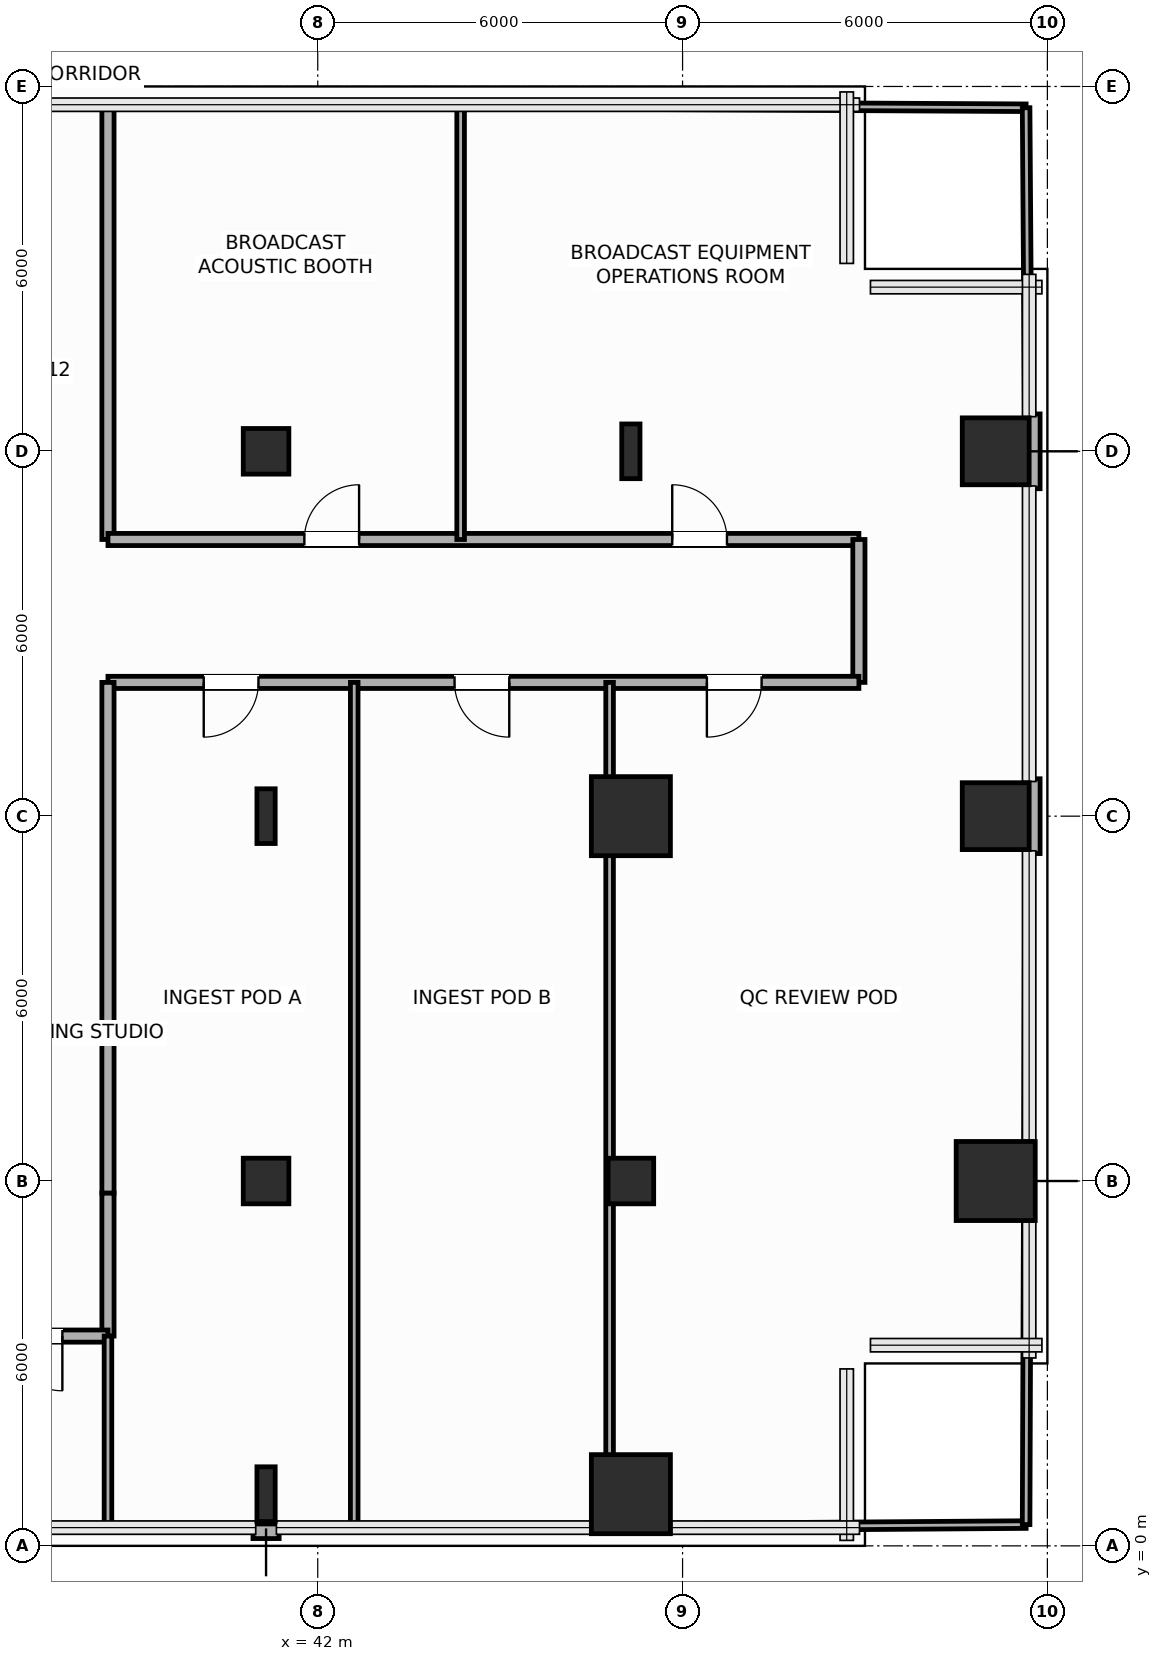
"""IFC4 building model, lengths in metres.
Left out: names, types, materials, properties, quantities, classifications, styles, units other than length and angle.
Written with IfcOpenShell. Run it as: python <this file> out.ifc"""

import sys

from ifc_helpers import new_model, si_unit, direction, frame, frame_2d, origin, origin_2d, place, context, subcontext, project, spatial, rectangle, hollow_rectangle, i_section, extrude, element, fill, save


model = new_model("IFC4")
c1 = context("Model", 3, precision=1e-05, world=origin(), true_north=direction((0.0, 1.0)))
c2 = subcontext(c1, "Body", "Model", "MODEL_VIEW")
j1 = project(units=[si_unit("LENGTHUNIT", "METRE"), si_unit("PLANEANGLEUNIT", "RADIAN")], contexts=[c1])
p1 = place(None, origin())
s1 = spatial("IfcSite", under=j1, at=p1, CompositionType="ELEMENT")
p2 = place(p1, origin())
s2 = spatial("IfcBuilding", under=s1, at=p2, CompositionType="ELEMENT")
p3 = place(p2, frame((0.0, 0.0, 48.0)))
s3 = spatial("IfcBuildingStorey", under=s2, at=p3, CompositionType="ELEMENT", Elevation=48.0)
p4 = place(p3, frame((41.15, 0.85, 0.0), z_axis=(0.0, 0.0, 1.0), x_axis=(1.0, 0.0, 0.0)))
e1 = element("IfcColumn", 1, at=p4, inside=s3, PredefinedType="COLUMN", context=c2, shape_type="SweptSolid", body=[
    extrude(i_section(OverallWidth=0.3, OverallDepth=0.9, WebThickness=0.019, FlangeThickness=0.035, FilletRadius=0.03, at=origin_2d()), origin(), (0.0, 0.0, 1.0), 3.9),
])
p5 = place(p3, frame((41.15, 6.0, 0.0), z_axis=(0.0, 0.0, 1.0), x_axis=(1.0, 0.0, 0.0)))
e2 = element("IfcColumn", 2, at=p5, inside=s3, PredefinedType="COLUMN", context=c2, shape_type="SweptSolid", body=[
    extrude(hollow_rectangle(XDim=0.75, YDim=0.75, WallThickness=0.035, InnerFilletRadius=0.035, OuterFilletRadius=0.05, at=origin_2d()), origin(), (0.0, 0.0, 1.0), 3.9),
])
p6 = place(p3, frame((41.15, 12.0, 0.0), z_axis=(0.0, 0.0, 1.0), x_axis=(1.0, 0.0, 0.0)))
e3 = element("IfcColumn", 3, at=p6, inside=s3, PredefinedType="COLUMN", context=c2, shape_type="SweptSolid", body=[
    extrude(i_section(OverallWidth=0.3, OverallDepth=0.9, WebThickness=0.019, FlangeThickness=0.035, FilletRadius=0.03, at=origin_2d()), origin(), (0.0, 0.0, 1.0), 3.9),
])
p7 = place(p3, frame((41.15, 18.0, 0.0), z_axis=(0.0, 0.0, 1.0), x_axis=(1.0, 0.0, 0.0)))
e4 = element("IfcColumn", 4, at=p7, inside=s3, PredefinedType="COLUMN", context=c2, shape_type="SweptSolid", body=[
    extrude(hollow_rectangle(XDim=0.75, YDim=0.75, WallThickness=0.035, InnerFilletRadius=0.035, OuterFilletRadius=0.05, at=origin_2d()), origin(), (0.0, 0.0, 1.0), 3.9),
])
p8 = place(p3, frame((47.15, 0.85, 0.0), z_axis=(0.0, 0.0, 1.0), x_axis=(1.0, 0.0, 0.0)))
e5 = element("IfcColumn", 5, at=p8, inside=s3, PredefinedType="COLUMN", context=c2, shape_type="SweptSolid", body=[
    extrude(rectangle(XDim=1.3, YDim=1.3, at=origin_2d()), origin(), (0.0, 0.0, 1.0), 3.9),
])
p9 = place(p3, frame((47.15, 6.0, 0.0), z_axis=(0.0, 0.0, 1.0), x_axis=(1.0, 0.0, 0.0)))
e6 = element("IfcColumn", 6, at=p9, inside=s3, PredefinedType="COLUMN", context=c2, shape_type="SweptSolid", body=[
    extrude(hollow_rectangle(XDim=0.75, YDim=0.75, WallThickness=0.035, InnerFilletRadius=0.035, OuterFilletRadius=0.05, at=origin_2d()), origin(), (0.0, 0.0, 1.0), 3.9),
])
p10 = place(p3, frame((47.15, 12.0, 0.0), z_axis=(0.0, 0.0, 1.0), x_axis=(1.0, 0.0, 0.0)))
e7 = element("IfcColumn", 7, at=p10, inside=s3, PredefinedType="COLUMN", context=c2, shape_type="SweptSolid", body=[
    extrude(rectangle(XDim=1.3, YDim=1.3, at=origin_2d()), origin(), (0.0, 0.0, 1.0), 3.9),
])
p11 = place(p3, frame((47.15, 18.0, 0.0), z_axis=(0.0, 0.0, 1.0), x_axis=(1.0, 0.0, 0.0)))
e8 = element("IfcColumn", 8, at=p11, inside=s3, PredefinedType="COLUMN", context=c2, shape_type="SweptSolid", body=[
    extrude(i_section(OverallWidth=0.3, OverallDepth=0.9, WebThickness=0.019, FlangeThickness=0.035, FilletRadius=0.03, at=origin_2d()), origin(), (0.0, 0.0, 1.0), 3.9),
])
p12 = place(p3, frame((53.15, 6.0, 0.0), z_axis=(0.0, 0.0, 1.0), x_axis=(1.0, 0.0, 0.0)))
e9 = element("IfcColumn", 9, at=p12, inside=s3, PredefinedType="COLUMN", context=c2, shape_type="SweptSolid", body=[
    extrude(rectangle(XDim=1.3, YDim=1.3, at=origin_2d()), origin(), (0.0, 0.0, 1.0), 3.9),
])
for number, where, z_axis, x_axis in (
    (10, (53.15, 12.0, 0.0), (0.0, 0.0, 1.0), (1.0, 0.0, 0.0)),
    (11, (53.15, 18.0, 0.0), (0.0, 0.0, 1.0), (1.0, 0.0, 0.0)),
):
    element("IfcColumn", number, at=place(p3, frame(where, z_axis=z_axis, x_axis=x_axis)), inside=s3, PredefinedType="COLUMN", context=c2, shape_type="SweptSolid", body=[
        extrude(rectangle(XDim=1.1, YDim=1.1, at=origin_2d()), origin(), (0.0, 0.0, 1.0), 3.9),
    ])
for number, where, z_axis, x_axis in (
    (12, (53.76, 18.615, 0.0), (0.0, 0.0, 1.0), (0.0, -1.0, 0.0)),
    (13, (53.76, 12.615, 0.0), (0.0, 0.0, 1.0), (0.0, -1.0, 0.0)),
):
    element("IfcWall", number, at=place(p3, frame(where, z_axis=z_axis, x_axis=x_axis)), inside=s3, PredefinedType="SOLIDWALL", context=c2, shape_type="SweptSolid", body=[
        extrude(rectangle(XDim=1.23, YDim=0.24, at=frame_2d((0.615, 0.0))), origin(), (0.0, 0.0, 1.0), 3.65),
    ])
p13 = place(p3, frame((41.365, 0.24, 0.0), z_axis=(0.0, 0.0, 1.0), x_axis=(-1.0, 0.0, 0.0)))
e14 = element("IfcWall", 14, at=p13, inside=s3, PredefinedType="SOLIDWALL", context=c2, shape_type="SweptSolid", body=[
    extrude(rectangle(XDim=0.43, YDim=0.24, at=frame_2d((0.215, 0.0))), origin(), (0.0, 0.0, 1.0), 3.65),
])
p14 = place(p3, frame((38.55, 23.7, 0.0), z_axis=(0.0, 0.0, 1.0), x_axis=(0.0, -1.0, 0.0)))
e15 = element("IfcWall", 15, at=p14, inside=s3, PredefinedType="PARTITIONING", context=c2, shape_type="SweptSolid", body=[
    extrude(rectangle(XDim=7.15, YDim=0.2, at=frame_2d((3.575, 0.0))), origin(), (0.0, 0.0, 1.0), 3.65),
])
p15 = place(p3, frame((38.55, 16.55, 0.0), z_axis=(0.0, 0.0, 1.0), x_axis=(1.0, 0.0, 0.0)))
e16 = element("IfcWall", 16, at=p15, inside=s3, PredefinedType="PARTITIONING", context=c2, shape_type="SweptSolid", body=[
    extrude(rectangle(XDim=12.35, YDim=0.2, at=frame_2d((6.175, 0.0))), origin(), (0.0, 0.0, 1.0), 3.65),
])
p16 = place(p15, frame((3.23, 0.0, 0.0)))
e17 = element("IfcOpeningElement", 17, at=p16, cuts=e16, PredefinedType="OPENING", context=c2, shape_type="SweptSolid", body=[
    extrude(rectangle(XDim=0.9, YDim=2.1, at=frame_2d((0.45, 1.05))), frame((0.0, 0.11, 0.0), z_axis=(0.0, -1.0, 0.0), x_axis=(1.0, 0.0, 0.0)), (0.0, 0.0, 1.0), 0.22),
])
p17 = place(p15, frame((9.28, 0.0, 0.0)))
e18 = element("IfcOpeningElement", 18, at=p17, cuts=e16, PredefinedType="OPENING", context=c2, shape_type="SweptSolid", body=[
    extrude(rectangle(XDim=0.9, YDim=2.1, at=frame_2d((0.45, 1.05))), frame((0.0, 0.11, 0.0), z_axis=(0.0, -1.0, 0.0), x_axis=(1.0, 0.0, 0.0)), (0.0, 0.0, 1.0), 0.22),
])
p18 = place(p3, frame((50.9, 16.55, 0.0), z_axis=(0.0, 0.0, 1.0), x_axis=(0.0, -1.0, 0.0)))
e19 = element("IfcWall", 19, at=p18, inside=s3, PredefinedType="PARTITIONING", context=c2, shape_type="SweptSolid", body=[
    extrude(rectangle(XDim=2.35, YDim=0.2, at=frame_2d((1.175, 0.0))), origin(), (0.0, 0.0, 1.0), 3.65),
])
p19 = place(p3, frame((50.9, 14.2, 0.0), z_axis=(0.0, 0.0, 1.0), x_axis=(-1.0, 0.0, 0.0)))
e20 = element("IfcWall", 20, at=p19, inside=s3, PredefinedType="PARTITIONING", context=c2, shape_type="SweptSolid", body=[
    extrude(rectangle(XDim=12.35, YDim=0.2, at=frame_2d((6.175, 0.0))), origin(), (0.0, 0.0, 1.0), 3.65),
])
p20 = place(p19, frame((9.875, 0.0, 0.0)))
e21 = element("IfcOpeningElement", 21, at=p20, cuts=e20, PredefinedType="OPENING", context=c2, shape_type="SweptSolid", body=[
    extrude(rectangle(XDim=0.9, YDim=2.1, at=frame_2d((0.45, 1.05))), frame((0.0, 0.11, 0.0), z_axis=(0.0, -1.0, 0.0), x_axis=(1.0, 0.0, 0.0)), (0.0, 0.0, 1.0), 0.22),
])
p21 = place(p19, frame((5.75, 0.0, 0.0)))
e22 = element("IfcOpeningElement", 22, at=p21, cuts=e20, PredefinedType="OPENING", context=c2, shape_type="SweptSolid", body=[
    extrude(rectangle(XDim=0.9, YDim=2.1, at=frame_2d((0.45, 1.05))), frame((0.0, 0.11, 0.0), z_axis=(0.0, -1.0, 0.0), x_axis=(1.0, 0.0, 0.0)), (0.0, 0.0, 1.0), 0.22),
])
p22 = place(p19, frame((1.6, 0.0, 0.0)))
e23 = element("IfcOpeningElement", 23, at=p22, cuts=e20, PredefinedType="OPENING", context=c2, shape_type="SweptSolid", body=[
    extrude(rectangle(XDim=0.9, YDim=2.1, at=frame_2d((0.45, 1.05))), frame((0.0, 0.11, 0.0), z_axis=(0.0, -1.0, 0.0), x_axis=(1.0, 0.0, 0.0)), (0.0, 0.0, 1.0), 0.22),
])
p23 = place(p3, frame((38.55, 14.2, 0.0), z_axis=(0.0, 0.0, 1.0), x_axis=(0.0, -1.0, 0.0)))
e24 = element("IfcWall", 24, at=p23, inside=s3, PredefinedType="PARTITIONING", context=c2, shape_type="SweptSolid", body=[
    extrude(rectangle(XDim=8.4, YDim=0.2, at=frame_2d((4.2, 0.0))), origin(), (0.0, 0.0, 1.0), 3.65),
])
p24 = place(p3, frame((38.55, 5.8, 0.0), z_axis=(0.0, 0.0, 1.0), x_axis=(0.0, -1.0, 0.0)))
e25 = element("IfcWall", 25, at=p24, inside=s3, PredefinedType="PARTITIONING", context=c2, shape_type="SweptSolid", body=[
    extrude(rectangle(XDim=2.35, YDim=0.2, at=frame_2d((1.175, 0.0))), origin(), (0.0, 0.0, 1.0), 3.65),
])
p25 = place(p3, frame((38.55, 3.45, 0.0), z_axis=(0.0, 0.0, 1.0), x_axis=(-1.0, 0.0, 0.0)))
e26 = element("IfcWall", 26, at=p25, inside=s3, PredefinedType="PARTITIONING", context=c2, shape_type="SweptSolid", body=[
    extrude(rectangle(XDim=2.4, YDim=0.2, at=frame_2d((1.2, 0.0))), origin(), (0.0, 0.0, 1.0), 3.142),
])
p26 = place(p25, frame((0.75, 0.0, 0.0)))
e27 = element("IfcOpeningElement", 27, at=p26, cuts=e26, PredefinedType="OPENING", context=c2, shape_type="SweptSolid", body=[
    extrude(rectangle(XDim=0.9, YDim=2.1, at=frame_2d((0.45, 1.05))), frame((0.0, 0.11, 0.0), z_axis=(0.0, -1.0, 0.0), x_axis=(1.0, 0.0, 0.0)), (0.0, 0.0, 1.0), 0.22),
])
for number, where, z_axis, x_axis in (
    (28, (42.6, 0.3, 0.0), (0.0, 0.0, 1.0), (0.0, 1.0, 0.0)),
    (29, (46.8, 0.3, 0.0), (0.0, 0.0, 1.0), (0.0, 1.0, 0.0)),
):
    element("IfcWall", number, at=place(p3, frame(where, z_axis=z_axis, x_axis=x_axis)), inside=s3, PredefinedType="PARTITIONING", context=c2, shape_type="SweptSolid", body=[
        extrude(rectangle(XDim=13.9, YDim=0.125, at=frame_2d((6.95, 0.0))), origin(), (0.0, 0.0, 1.0), 3.65),
    ])
p27 = place(p3, frame((46.8, 0.3, 0.0), z_axis=(0.0, 0.0, 1.0), x_axis=(0.999973308199, 0.007306359489, 0.0)))
e30 = element("IfcWall", 30, at=p27, inside=s3, PredefinedType="PARTITIONING", context=c2, shape_type="SweptSolid", body=[
    extrude(rectangle(XDim=6.85, YDim=0.125, at=frame_2d((3.425, 0.0))), origin(), (0.0, 0.0, 1.0), 3.65),
])
p28 = place(p3, frame((53.65, 0.35, 0.0), z_axis=(0.0, 0.0, 1.0), x_axis=(0.003606251025, 0.999993497456, 0.0)))
e31 = element("IfcWall", 31, at=p28, inside=s3, PredefinedType="PARTITIONING", context=c2, shape_type="SweptSolid", body=[
    extrude(rectangle(XDim=11.035, YDim=0.125, at=frame_2d((5.518, 0.0))), origin(), (0.0, 0.0, 1.0), 3.65),
])
p29 = place(p3, frame((53.694, 12.615, 0.0), z_axis=(0.0, 0.0, 1.0), x_axis=(0.003542799701, 0.999993724265, 0.0)))
e32 = element("IfcWall", 32, at=p29, inside=s3, PredefinedType="PARTITIONING", context=c2, shape_type="SweptSolid", body=[
    extrude(rectangle(XDim=1.585, YDim=0.125, at=frame_2d((0.792, 0.0))), origin(), (0.0, 0.0, 1.0), 3.65),
])
p30 = place(p3, frame((44.35, 16.55, 0.0), z_axis=(0.0, 0.0, 1.0), x_axis=(0.0, 1.0, 0.0)))
e33 = element("IfcWall", 33, at=p30, inside=s3, PredefinedType="PARTITIONING", context=c2, shape_type="SweptSolid", body=[
    extrude(rectangle(XDim=7.15, YDim=0.125, at=frame_2d((3.575, 0.0))), origin(), (0.0, 0.0, 1.0), 3.65),
])
p31 = place(p3, frame((44.35, 23.7, 0.0), z_axis=(0.0, 0.0, 1.0), x_axis=(0.999985518927, -0.005381629512, 0.0)))
e34 = element("IfcWall", 34, at=p31, inside=s3, PredefinedType="PARTITIONING", context=c2, shape_type="SweptSolid", body=[
    extrude(rectangle(XDim=9.3, YDim=0.125, at=frame_2d((4.65, 0.0))), origin(), (0.0, 0.0, 1.0), 3.65),
])
p32 = place(p3, frame((53.7, 16.55, 0.0), z_axis=(0.0, 0.0, 1.0), x_axis=(-0.007017371073, 0.999975377948, 0.0)))
e35 = element("IfcWall", 35, at=p32, inside=s3, PredefinedType="PARTITIONING", context=c2, shape_type="SweptSolid", body=[
    extrude(rectangle(XDim=0.835, YDim=0.125, at=frame_2d((0.417, 0.0))), origin(), (0.0, 0.0, 1.0), 3.65),
])
p33 = place(p3, frame((53.686, 18.615, 0.0), z_axis=(0.0, 0.0, 1.0), x_axis=(-0.007079296972, 0.999974941463, 0.0)))
e36 = element("IfcWall", 36, at=p33, inside=s3, PredefinedType="PARTITIONING", context=c2, shape_type="SweptSolid", body=[
    extrude(rectangle(XDim=5.035, YDim=0.125, at=frame_2d((2.518, 0.0))), origin(), (0.0, 0.0, 1.0), 3.65),
])
p34 = place(p3, frame((38.55, 0.3, 0.0), z_axis=(0.0, 0.0, 1.0), x_axis=(0.0, 1.0, 0.0)))
e37 = element("IfcWall", 37, at=p34, inside=s3, PredefinedType="PARTITIONING", context=c2, shape_type="SweptSolid", body=[
    extrude(rectangle(XDim=3.15, YDim=0.125, at=frame_2d((1.575, 0.0))), origin(), (0.0, 0.0, 1.0), 3.65),
])
p35 = place(p16, origin())
e38 = element("IfcDoor", 38, at=p35, inside=s3, OperationType="SINGLE_SWING_RIGHT", PredefinedType="DOOR", context=c2, shape_type="SweptSolid", body=[
    extrude(rectangle(XDim=0.9, YDim=2.1, at=frame_2d((0.45, 1.05))), frame((0.0, 0.025, 0.0), z_axis=(0.0, -1.0, 0.0), x_axis=(1.0, 0.0, 0.0)), (0.0, 0.0, 1.0), 0.05),
])
fill(e17, e38)
p36 = place(p17, origin())
e39 = element("IfcDoor", 39, at=p36, inside=s3, OperationType="SINGLE_SWING_LEFT", PredefinedType="DOOR", context=c2, shape_type="SweptSolid", body=[
    extrude(rectangle(XDim=0.9, YDim=2.1, at=frame_2d((0.45, 1.05))), frame((0.0, 0.025, 0.0), z_axis=(0.0, -1.0, 0.0), x_axis=(1.0, 0.0, 0.0)), (0.0, 0.0, 1.0), 0.05),
])
fill(e18, e39)
p37 = place(p20, origin())
e40 = element("IfcDoor", 40, at=p37, inside=s3, OperationType="SINGLE_SWING_RIGHT", PredefinedType="DOOR", context=c2, shape_type="SweptSolid", body=[
    extrude(rectangle(XDim=0.9, YDim=2.1, at=frame_2d((0.45, 1.05))), frame((0.0, 0.025, 0.0), z_axis=(0.0, -1.0, 0.0), x_axis=(1.0, 0.0, 0.0)), (0.0, 0.0, 1.0), 0.05),
])
fill(e21, e40)
p38 = place(p21, origin())
e41 = element("IfcDoor", 41, at=p38, inside=s3, OperationType="SINGLE_SWING_LEFT", PredefinedType="DOOR", context=c2, shape_type="SweptSolid", body=[
    extrude(rectangle(XDim=0.9, YDim=2.1, at=frame_2d((0.45, 1.05))), frame((0.0, 0.025, 0.0), z_axis=(0.0, -1.0, 0.0), x_axis=(1.0, 0.0, 0.0)), (0.0, 0.0, 1.0), 0.05),
])
fill(e22, e41)
p39 = place(p22, origin())
e42 = element("IfcDoor", 42, at=p39, inside=s3, OperationType="SINGLE_SWING_RIGHT", PredefinedType="DOOR", context=c2, shape_type="SweptSolid", body=[
    extrude(rectangle(XDim=0.9, YDim=2.1, at=frame_2d((0.45, 1.05))), frame((0.0, 0.025, 0.0), z_axis=(0.0, -1.0, 0.0), x_axis=(1.0, 0.0, 0.0)), (0.0, 0.0, 1.0), 0.05),
])
fill(e23, e42)
p40 = place(p26, origin())
e43 = element("IfcDoor", 43, at=p40, inside=s3, OperationType="SINGLE_SWING_LEFT", PredefinedType="DOOR", context=c2, shape_type="SweptSolid", body=[
    extrude(rectangle(XDim=0.9, YDim=2.1, at=frame_2d((0.45, 1.05))), frame((0.0, 0.025, 0.0), z_axis=(0.0, -1.0, 0.0), x_axis=(1.0, 0.0, 0.0)), (0.0, 0.0, 1.0), 0.05),
])
fill(e27, e43)
save(model, sys.argv[1])
